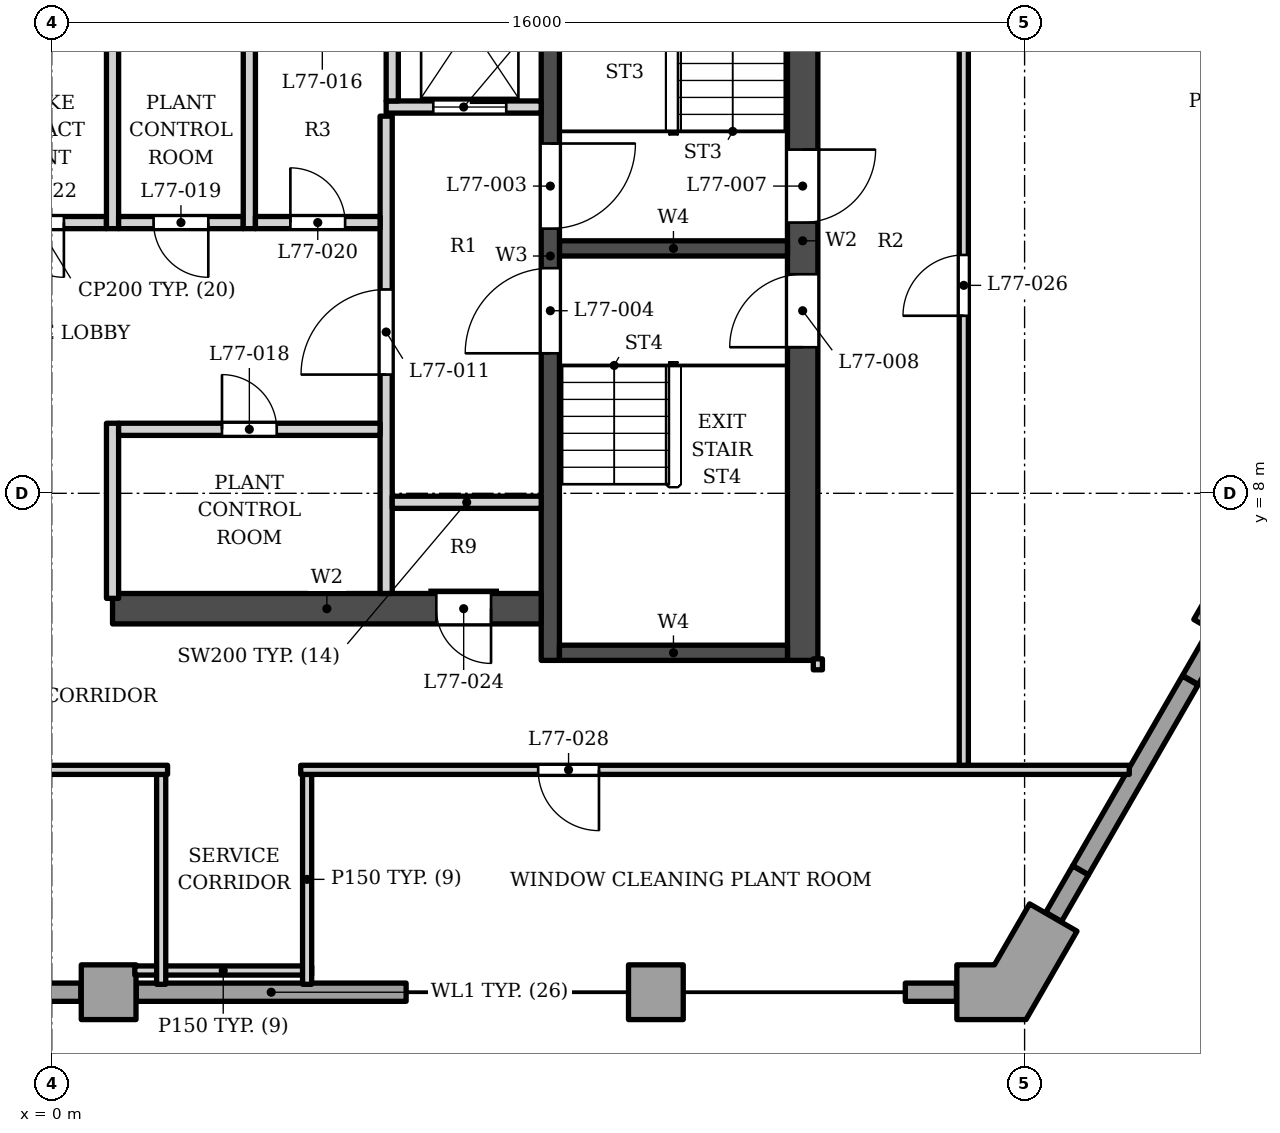
"""IFC4 building model, lengths in metres.
Left out: names, types, materials, properties, quantities, classifications, styles, units other than length and angle.
Written with IfcOpenShell. Run it as: python <this file> out.ifc"""

import sys

from ifc_helpers import new_model, si_unit, direction, frame, frame_2d, origin, place, context, subcontext, project, spatial, polyline, rectangle, outline, extrude, element, fill, save


model = new_model("IFC4")
c1 = context("Model", 3, precision=1e-05, world=origin(), true_north=direction((0.0, 1.0)))
c2 = subcontext(c1, "Body", "Model", "MODEL_VIEW")
j1 = project(units=[si_unit("LENGTHUNIT", "METRE"), si_unit("PLANEANGLEUNIT", "RADIAN")], contexts=[c1])
p1 = place(None, origin())
s1 = spatial("IfcSite", under=j1, at=p1, CompositionType="ELEMENT")
p2 = place(p1, origin())
s2 = spatial("IfcBuilding", under=s1, at=p2, CompositionType="ELEMENT")
p3 = place(p2, frame((0.0, 0.0, 330.5)))
s3 = spatial("IfcBuildingStorey", under=s2, at=p3, CompositionType="ELEMENT", Elevation=330.5)
p4 = place(p3, frame((12.35, 5.253, 0.0), z_axis=(0.0, 0.0, 1.0), x_axis=(0.0, 1.0, 0.0)))
e1 = element("IfcWall", 1, at=p4, inside=s3, PredefinedType="SHEAR", context=c2, shape_type="SweptSolid", body=[
    extrude(rectangle(XDim=13.8, YDim=0.5, at=frame_2d((6.9, 0.0))), origin(), (0.0, 0.0, 1.0), 5.0),
])
p5 = place(p4, frame((7.2, 0.0, 0.0)))
e2 = element("IfcOpeningElement", 2, at=p5, cuts=e1, PredefinedType="OPENING", context=c2, shape_type="SweptSolid", body=[
    extrude(rectangle(XDim=1.2, YDim=2.1, at=frame_2d((0.6, 1.05))), frame((0.0, 0.26, 0.0), z_axis=(0.0, -1.0, 0.0), x_axis=(1.0, 0.0, 0.0)), (0.0, 0.0, 1.0), 0.52),
])
p6 = place(p4, frame((5.15, 0.0, 0.0)))
e3 = element("IfcOpeningElement", 3, at=p6, cuts=e1, PredefinedType="OPENING", context=c2, shape_type="SweptSolid", body=[
    extrude(rectangle(XDim=1.2, YDim=2.1, at=frame_2d((0.6, 1.05))), frame((0.0, 0.26, 0.0), z_axis=(0.0, -1.0, 0.0), x_axis=(1.0, 0.0, 0.0)), (0.0, 0.0, 1.0), 0.52),
])
p7 = place(p3, frame((8.2, 5.253, 0.0), z_axis=(0.0, 0.0, 1.0), x_axis=(0.0, 1.0, 0.0)))
e4 = element("IfcWall", 4, at=p7, inside=s3, PredefinedType="SHEAR", context=c2, shape_type="SweptSolid", body=[
    extrude(rectangle(XDim=13.3, YDim=0.3, at=frame_2d((6.65, 0.0))), origin(), (0.0, 0.0, 1.0), 5.0),
])
p8 = place(p7, frame((7.1, 0.0, 0.0)))
e5 = element("IfcOpeningElement", 5, at=p8, cuts=e4, PredefinedType="OPENING", context=c2, shape_type="SweptSolid", body=[
    extrude(rectangle(XDim=1.4, YDim=2.1, at=frame_2d((0.7, 1.05))), frame((0.0, 0.16, 0.0), z_axis=(0.0, -1.0, 0.0), x_axis=(1.0, 0.0, 0.0)), (0.0, 0.0, 1.0), 0.32),
])
p9 = place(p7, frame((5.05, 0.0, 0.0)))
e6 = element("IfcOpeningElement", 6, at=p9, cuts=e4, PredefinedType="OPENING", context=c2, shape_type="SweptSolid", body=[
    extrude(rectangle(XDim=1.4, YDim=2.1, at=frame_2d((0.7, 1.05))), frame((0.0, 0.16, 0.0), z_axis=(0.0, -1.0, 0.0), x_axis=(1.0, 0.0, 0.0)), (0.0, 0.0, 1.0), 0.32),
])
for number, where, z_axis, x_axis in (
    (7, (8.35, 12.028, 0.0), (0.0, 0.0, 1.0), (1.0, 0.0, 0.0)),
    (8, (8.35, 5.378, 0.0), (0.0, 0.0, 1.0), (1.0, 0.0, 0.0)),
):
    element("IfcWall", number, at=place(p3, frame(where, z_axis=z_axis, x_axis=x_axis)), inside=s3, PredefinedType="SHEAR", context=c2, shape_type="SweptSolid", body=[
        extrude(rectangle(XDim=3.75, YDim=0.25, at=frame_2d((1.875, 0.0))), origin(), (0.0, 0.0, 1.0), 5.0),
    ])
p10 = place(p3, frame((1.0, 6.103, 0.0), z_axis=(0.0, 0.0, 1.0), x_axis=(1.0, 0.0, 0.0)))
e9 = element("IfcWall", 9, at=p10, inside=s3, PredefinedType="SHEAR", context=c2, shape_type="SweptSolid", body=[
    extrude(rectangle(XDim=7.05, YDim=0.5, at=frame_2d((3.525, 0.0))), origin(), (0.0, 0.0, 1.0), 5.0),
])
p11 = place(p10, frame((5.325, 0.0, 0.0)))
e10 = element("IfcOpeningElement", 10, at=p11, cuts=e9, PredefinedType="OPENING", context=c2, shape_type="SweptSolid", body=[
    extrude(rectangle(XDim=0.9, YDim=2.1, at=frame_2d((0.45, 1.05))), frame((0.0, 0.26, 0.0), z_axis=(0.0, -1.0, 0.0), x_axis=(1.0, 0.0, 0.0)), (0.0, 0.0, 1.0), 0.52),
])
p12 = place(p3, origin())
e11 = element("IfcWall", 11, at=p12, inside=s3, PredefinedType="SOLIDWALL", context=c2, shape_type="SweptSolid", body=[
    extrude(outline(polyline([(1.386, 0.246), (0.486, 0.246), (0.486, -0.655), (1.386, -0.655), (1.386, 0.246)])), origin(), (0.0, 0.0, 1.0), 3.297),
])
p13 = place(p3, origin())
e12 = element("IfcWall", 12, at=p13, inside=s3, PredefinedType="SOLIDWALL", context=c2, shape_type="SweptSolid", body=[
    extrude(outline(polyline([(10.386, 0.246), (9.486, 0.246), (9.486, -0.655), (10.386, -0.655), (10.386, 0.246)])), origin(), (0.0, 0.0, 1.0), 3.297),
])
p14 = place(p3, frame((16.922, 1.803, 0.0), z_axis=(0.0, 0.0, 1.0), x_axis=(0.500012057535, 0.866018442252, 0.0)))
e13 = element("IfcWall", 13, at=p14, inside=s3, PredefinedType="ELEMENTEDWALL", context=c2, shape_type="SweptSolid", body=[
    extrude(rectangle(XDim=3.6, YDim=0.3, at=frame_2d((1.8, 0.0))), origin(), (0.0, 0.0, 1.0), 3.8),
])
p15 = place(p3, origin())
e14 = element("IfcWall", 14, at=p15, inside=s3, PredefinedType="SOLIDWALL", context=c2, shape_type="SweptSolid", body=[
    extrude(outline(polyline([(14.886, 0.246), (14.886, -0.655), (16.023, -0.655), (16.862, 0.799), (16.083, 1.249), (15.504, 0.246), (14.886, 0.246)])), origin(), (0.0, 0.0, 1.0), 3.297),
])
p16 = place(p3, origin())
e15 = element("IfcWall", 15, at=p16, inside=s3, PredefinedType="SOLIDWALL", context=c2, shape_type="SweptSolid", body=[
    extrude(outline(polyline([(18.783, 5.925), (19.562, 5.475), (20.247, 6.661), (21.059, 7.549), (20.395, 8.156), (19.516, 7.196), (18.783, 5.925)])), origin(), (0.0, 0.0, 1.0), 3.8),
])
p17 = place(p3, frame((-7.61, -0.204, 0.0), z_axis=(0.0, 0.0, 1.0), x_axis=(1.0, 0.0, 0.0)))
e16 = element("IfcWall", 16, at=p17, inside=s3, PredefinedType="ELEMENTEDWALL", context=c2, shape_type="SweptSolid", body=[
    extrude(rectangle(XDim=8.089, YDim=0.3, at=frame_2d((4.044, 0.0))), origin(), (0.0, 0.0, 1.0), 3.279),
])
p18 = place(p3, frame((1.39, -0.204, 0.0), z_axis=(0.0, 0.0, 1.0), x_axis=(1.0, 0.0, 0.0)))
e17 = element("IfcWall", 17, at=p18, inside=s3, PredefinedType="ELEMENTEDWALL", context=c2, shape_type="SweptSolid", body=[
    extrude(rectangle(XDim=4.438, YDim=0.3, at=frame_2d((2.219, 0.0))), origin(), (0.0, 0.0, 1.0), 3.279),
])
p19 = place(p3, frame((14.038, -0.204, 0.0), z_axis=(0.0, 0.0, 1.0), x_axis=(1.0, 0.0, 0.0)))
e18 = element("IfcWall", 18, at=p19, inside=s3, PredefinedType="ELEMENTEDWALL", context=c2, shape_type="SweptSolid", body=[
    extrude(rectangle(XDim=0.84, YDim=0.3, at=frame_2d((0.42, 0.0))), origin(), (0.0, 0.0, 1.0), 3.279),
])
for number, where, z_axis, x_axis in (
    (19, (16.479, 1.034, 0.0), (0.0, 0.0, 1.0), (0.5, 0.866, 0.0)),
    (20, (18.729, 4.931, 0.0), (0.0, 0.0, 1.0), (0.5, 0.866, 0.0)),
):
    element("IfcWall", number, at=place(p3, frame(where, z_axis=z_axis, x_axis=x_axis)), inside=s3, PredefinedType="ELEMENTEDWALL", context=c2, shape_type="SweptSolid", body=[
        extrude(rectangle(XDim=0.884, YDim=0.3, at=frame_2d((0.442, 0.0))), origin(), (0.0, 0.0, 1.0), 3.8),
    ])
p20 = place(p3, frame((1.0, 6.273, 0.0), z_axis=(0.0, 0.0, 1.0), x_axis=(0.0, 1.0, 0.0)))
e21 = element("IfcWall", 21, at=p20, inside=s3, PredefinedType="PARTITIONING", context=c2, shape_type="SweptSolid", body=[
    extrude(rectangle(XDim=2.88, YDim=0.2, at=frame_2d((1.44, 0.0))), origin(), (0.0, 0.0, 1.0), 4.8),
])
p21 = place(p3, frame((5.5, 6.353, 0.0), z_axis=(0.0, 0.0, 1.0), x_axis=(0.0, 1.0, 0.0)))
e22 = element("IfcWall", 22, at=p21, inside=s3, PredefinedType="SOLIDWALL", context=c2, shape_type="SweptSolid", body=[
    extrude(rectangle(XDim=7.85, YDim=0.2, at=frame_2d((3.925, 0.0))), origin(), (0.0, 0.0, 1.0), 4.8),
])
p22 = place(p21, frame((3.6, 0.0, 0.0)))
e23 = element("IfcOpeningElement", 23, at=p22, cuts=e22, PredefinedType="OPENING", context=c2, shape_type="SweptSolid", body=[
    extrude(rectangle(XDim=1.4, YDim=2.1, at=frame_2d((0.7, 1.05))), frame((0.0, 0.11, 0.0), z_axis=(0.0, -1.0, 0.0), x_axis=(1.0, 0.0, 0.0)), (0.0, 0.0, 1.0), 0.22),
])
p23 = place(p3, frame((5.6, 7.853, 0.0), z_axis=(0.0, 0.0, 1.0), x_axis=(1.0, 0.0, 0.0)))
e24 = element("IfcWall", 24, at=p23, inside=s3, PredefinedType="SOLIDWALL", context=c2, shape_type="SweptSolid", body=[
    extrude(rectangle(XDim=2.45, YDim=0.2, at=frame_2d((1.225, 0.0))), origin(), (0.0, 0.0, 1.0), 4.8),
])
p24 = place(p3, frame((1.1, 9.052, 0.0), z_axis=(0.0, 0.0, 1.0), x_axis=(1.0, 0.0, 0.0)))
e25 = element("IfcWall", 25, at=p24, inside=s3, PredefinedType="PARTITIONING", context=c2, shape_type="SweptSolid", body=[
    extrude(rectangle(XDim=4.3, YDim=0.2, at=frame_2d((2.15, 0.0))), origin(), (0.0, 0.0, 1.0), 4.8),
])
p25 = place(p24, frame((1.7, 0.0, 0.0)))
e26 = element("IfcOpeningElement", 26, at=p25, cuts=e25, PredefinedType="OPENING", context=c2, shape_type="SweptSolid", body=[
    extrude(rectangle(XDim=0.9, YDim=2.1, at=frame_2d((0.45, 1.05))), frame((0.0, 0.11, 0.0), z_axis=(0.0, -1.0, 0.0), x_axis=(1.0, 0.0, 0.0)), (0.0, 0.0, 1.0), 0.22),
])
p26 = place(p3, frame((-1.4, 12.453, 0.0), z_axis=(0.0, 0.0, 1.0), x_axis=(1.0, 0.0, 0.0)))
e27 = element("IfcWall", 27, at=p26, inside=s3, PredefinedType="PARTITIONING", context=c2, shape_type="SweptSolid", body=[
    extrude(rectangle(XDim=2.3, YDim=0.2, at=frame_2d((1.15, 0.0))), origin(), (0.0, 0.0, 1.0), 4.8),
])
p27 = place(p26, frame((0.7, 0.0, 0.0)))
e28 = element("IfcOpeningElement", 28, at=p27, cuts=e27, PredefinedType="OPENING", context=c2, shape_type="SweptSolid", body=[
    extrude(rectangle(XDim=0.9, YDim=2.1, at=frame_2d((0.45, 1.05))), frame((0.0, 0.11, 0.0), z_axis=(0.0, -1.0, 0.0), x_axis=(1.0, 0.0, 0.0)), (0.0, 0.0, 1.0), 0.22),
])
p28 = place(p3, frame((1.0, 12.353, 0.0), z_axis=(0.0, 0.0, 1.0), x_axis=(0.0, 1.0, 0.0)))
e29 = element("IfcWall", 29, at=p28, inside=s3, PredefinedType="PARTITIONING", context=c2, shape_type="SweptSolid", body=[
    extrude(rectangle(XDim=3.2, YDim=0.2, at=frame_2d((1.6, 0.0))), origin(), (0.0, 0.0, 1.0), 4.8),
])
p29 = place(p3, frame((1.1, 12.453, 0.0), z_axis=(0.0, 0.0, 1.0), x_axis=(1.0, 0.0, 0.0)))
e30 = element("IfcWall", 30, at=p29, inside=s3, PredefinedType="PARTITIONING", context=c2, shape_type="SweptSolid", body=[
    extrude(rectangle(XDim=2.05, YDim=0.2, at=frame_2d((1.025, 0.0))), origin(), (0.0, 0.0, 1.0), 4.8),
])
p30 = place(p29, frame((0.575, 0.0, 0.0)))
e31 = element("IfcOpeningElement", 31, at=p30, cuts=e30, PredefinedType="OPENING", context=c2, shape_type="SweptSolid", body=[
    extrude(rectangle(XDim=0.9, YDim=2.1, at=frame_2d((0.45, 1.05))), frame((0.0, 0.11, 0.0), z_axis=(0.0, -1.0, 0.0), x_axis=(1.0, 0.0, 0.0)), (0.0, 0.0, 1.0), 0.22),
])
p31 = place(p3, frame((3.25, 12.353, 0.0), z_axis=(0.0, 0.0, 1.0), x_axis=(0.0, 1.0, 0.0)))
e32 = element("IfcWall", 32, at=p31, inside=s3, PredefinedType="PARTITIONING", context=c2, shape_type="SweptSolid", body=[
    extrude(rectangle(XDim=3.2, YDim=0.2, at=frame_2d((1.6, 0.0))), origin(), (0.0, 0.0, 1.0), 4.8),
])
p32 = place(p3, frame((3.35, 12.453, 0.0), z_axis=(0.0, 0.0, 1.0), x_axis=(1.0, 0.0, 0.0)))
e33 = element("IfcWall", 33, at=p32, inside=s3, PredefinedType="PARTITIONING", context=c2, shape_type="SweptSolid", body=[
    extrude(rectangle(XDim=2.05, YDim=0.2, at=frame_2d((1.025, 0.0))), origin(), (0.0, 0.0, 1.0), 4.8),
])
p33 = place(p32, frame((0.575, 0.0, 0.0)))
e34 = element("IfcOpeningElement", 34, at=p33, cuts=e33, PredefinedType="OPENING", context=c2, shape_type="SweptSolid", body=[
    extrude(rectangle(XDim=0.9, YDim=2.1, at=frame_2d((0.45, 1.05))), frame((0.0, 0.11, 0.0), z_axis=(0.0, -1.0, 0.0), x_axis=(1.0, 0.0, 0.0)), (0.0, 0.0, 1.0), 0.22),
])
p34 = place(p3, frame((5.5, 14.353, 0.0), z_axis=(0.0, 0.0, 1.0), x_axis=(1.0, 0.0, 0.0)))
e35 = element("IfcWall", 35, at=p34, inside=s3, PredefinedType="SOLIDWALL", context=c2, shape_type="SweptSolid", body=[
    extrude(rectangle(XDim=2.55, YDim=0.2, at=frame_2d((1.275, 0.0))), origin(), (0.0, 0.0, 1.0), 4.8),
])
p35 = place(p34, frame((0.775, 0.0, 0.0)))
e36 = element("IfcOpeningElement", 36, at=p35, cuts=e35, PredefinedType="OPENING", context=c2, shape_type="SweptSolid", body=[
    extrude(rectangle(XDim=1.2, YDim=2.1, at=frame_2d((0.6, 1.05))), frame((0.0, 0.11, 0.0), z_axis=(0.0, -1.0, 0.0), x_axis=(1.0, 0.0, 0.0)), (0.0, 0.0, 1.0), 0.22),
])
p36 = place(p3, frame((5.6, 14.453, 0.0), z_axis=(0.0, 0.0, 1.0), x_axis=(0.0, 1.0, 0.0)))
e37 = element("IfcWall", 37, at=p36, inside=s3, PredefinedType="SOLIDWALL", context=c2, shape_type="SweptSolid", body=[
    extrude(rectangle(XDim=3.9, YDim=0.2, at=frame_2d((1.95, 0.0))), origin(), (0.0, 0.0, 1.0), 4.8),
])
p37 = place(p3, frame((1.366, 0.153, 0.0), z_axis=(0.0, 0.0, 1.0), x_axis=(1.0, 0.0, 0.0)))
e38 = element("IfcWall", 38, at=p37, inside=s3, PredefinedType="PARTITIONING", context=c2, shape_type="SweptSolid", body=[
    extrude(rectangle(XDim=2.909, YDim=0.15, at=frame_2d((1.455, 0.0))), origin(), (0.0, 0.0, 1.0), 3.912),
])
for number, where, z_axis, x_axis in (
    (39, (1.8, -0.074, 0.0), (0.0, 0.0, 1.0), (0.0, 1.0, 0.0)),
    (40, (4.2, -0.074, 0.0), (0.0, 0.0, 1.0), (0.0, 1.0, 0.0)),
):
    element("IfcWall", number, at=place(p3, frame(where, z_axis=z_axis, x_axis=x_axis)), inside=s3, PredefinedType="PARTITIONING", context=c2, shape_type="SweptSolid", body=[
        extrude(outline(polyline([(0.0, 0.0), (3.452, 0.0), (3.452, 4.8), (1.211, 4.8), (0.0, 3.784), (0.0, 0.0)])), frame((0.0, 0.075, 0.0), z_axis=(0.0, -1.0, 0.0), x_axis=(1.0, 0.0, 0.0)), (0.0, 0.0, 1.0), 0.15),
    ])
p38 = place(p3, frame((-15.85, 3.453, 0.0), z_axis=(0.0, 0.0, 1.0), x_axis=(1.0, 0.0, 0.0)))
e41 = element("IfcWall", 41, at=p38, inside=s3, PredefinedType="PARTITIONING", context=c2, shape_type="SweptSolid", body=[
    extrude(rectangle(XDim=17.755, YDim=0.15, at=frame_2d((8.877, 0.0))), origin(), (0.0, 0.0, 1.0), 4.8),
])
p39 = place(p38, frame((10.05, 0.0, 0.0)))
e42 = element("IfcOpeningElement", 42, at=p39, cuts=e41, PredefinedType="OPENING", context=c2, shape_type="SweptSolid", body=[
    extrude(rectangle(XDim=1.0, YDim=2.1, at=frame_2d((0.5, 1.05))), frame((0.0, 0.085, 0.0), z_axis=(0.0, -1.0, 0.0), x_axis=(1.0, 0.0, 0.0)), (0.0, 0.0, 1.0), 0.17),
])
p40 = place(p3, frame((4.095, 3.453, 0.0), z_axis=(0.0, 0.0, 1.0), x_axis=(1.0, 0.0, 0.0)))
e43 = element("IfcWall", 43, at=p40, inside=s3, PredefinedType="PARTITIONING", context=c2, shape_type="SweptSolid", body=[
    extrude(rectangle(XDim=13.627, YDim=0.15, at=frame_2d((6.813, 0.0))), origin(), (0.0, 0.0, 1.0), 4.8),
])
p41 = place(p40, frame((3.905, 0.0, 0.0)))
e44 = element("IfcOpeningElement", 44, at=p41, cuts=e43, PredefinedType="OPENING", context=c2, shape_type="SweptSolid", body=[
    extrude(rectangle(XDim=1.0, YDim=2.1, at=frame_2d((0.5, 1.05))), frame((0.0, 0.085, 0.0), z_axis=(0.0, -1.0, 0.0), x_axis=(1.0, 0.0, 0.0)), (0.0, 0.0, 1.0), 0.17),
])
p42 = place(p3, frame((15.0, 3.528, 0.0), z_axis=(0.0, 0.0, 1.0), x_axis=(0.0, 1.0, 0.0)))
e45 = element("IfcWall", 45, at=p42, inside=s3, PredefinedType="PARTITIONING", context=c2, shape_type="SweptSolid", body=[
    extrude(rectangle(XDim=15.83, YDim=0.15, at=frame_2d((7.915, 0.0))), origin(), (0.0, 0.0, 1.0), 4.02),
])
p43 = place(p42, frame((7.392, 0.0, 0.0)))
e46 = element("IfcOpeningElement", 46, at=p43, cuts=e45, PredefinedType="OPENING", context=c2, shape_type="SweptSolid", body=[
    extrude(rectangle(XDim=1.0, YDim=2.1, at=frame_2d((0.5, 1.05))), frame((0.0, 0.085, 0.0), z_axis=(0.0, -1.0, 0.0), x_axis=(1.0, 0.0, 0.0)), (0.0, 0.0, 1.0), 0.17),
])
p44 = place(p3, frame((12.6, 5.098, 0.0), z_axis=(0.0, 0.0, 1.0), x_axis=(0.0, 1.0, 0.0)))
e47 = element("IfcWall", 47, at=p44, inside=s3, PredefinedType="PARTITIONING", context=c2, shape_type="SweptSolid", body=[
    extrude(rectangle(XDim=0.18, YDim=0.15, at=frame_2d((0.09, 0.0))), origin(), (0.0, 0.0, 1.0), 4.8),
])
p45 = place(p35, origin())
e48 = element("IfcDoor", 48, at=p45, inside=s3, OperationType="DOUBLE_DOOR_SLIDING", PredefinedType="DOOR", context=c2, shape_type="SweptSolid", body=[
    extrude(rectangle(XDim=1.2, YDim=2.1, at=frame_2d((0.6, 1.05))), frame((0.0, 0.025, 0.0), z_axis=(0.0, -1.0, 0.0), x_axis=(1.0, 0.0, 0.0)), (0.0, 0.0, 1.0), 0.05),
])
fill(e36, e48)
p46 = place(p8, origin())
e49 = element("IfcDoor", 49, at=p46, inside=s3, OperationType="SINGLE_SWING_RIGHT", PredefinedType="DOOR", context=c2, shape_type="SweptSolid", body=[
    extrude(rectangle(XDim=1.4, YDim=2.1, at=frame_2d((0.7, 1.05))), frame((0.0, 0.025, 0.0), z_axis=(0.0, -1.0, 0.0), x_axis=(1.0, 0.0, 0.0)), (0.0, 0.0, 1.0), 0.05),
])
fill(e5, e49)
p47 = place(p9, origin())
e50 = element("IfcDoor", 50, at=p47, inside=s3, OperationType="SINGLE_SWING_LEFT", PredefinedType="DOOR", context=c2, shape_type="SweptSolid", body=[
    extrude(rectangle(XDim=1.4, YDim=2.1, at=frame_2d((0.7, 1.05))), frame((0.0, 0.025, 0.0), z_axis=(0.0, -1.0, 0.0), x_axis=(1.0, 0.0, 0.0)), (0.0, 0.0, 1.0), 0.05),
])
fill(e6, e50)
p48 = place(p5, origin())
e51 = element("IfcDoor", 51, at=p48, inside=s3, OperationType="SINGLE_SWING_RIGHT", PredefinedType="DOOR", context=c2, shape_type="SweptSolid", body=[
    extrude(rectangle(XDim=1.2, YDim=2.1, at=frame_2d((0.6, 1.05))), frame((0.0, 0.025, 0.0), z_axis=(0.0, -1.0, 0.0), x_axis=(1.0, 0.0, 0.0)), (0.0, 0.0, 1.0), 0.05),
])
fill(e2, e51)
p49 = place(p6, origin())
e52 = element("IfcDoor", 52, at=p49, inside=s3, OperationType="SINGLE_SWING_LEFT", PredefinedType="DOOR", context=c2, shape_type="SweptSolid", body=[
    extrude(rectangle(XDim=1.2, YDim=2.1, at=frame_2d((0.6, 1.05))), frame((0.0, 0.025, 0.0), z_axis=(0.0, -1.0, 0.0), x_axis=(1.0, 0.0, 0.0)), (0.0, 0.0, 1.0), 0.05),
])
fill(e3, e52)
p50 = place(p22, origin())
e53 = element("IfcDoor", 53, at=p50, inside=s3, OperationType="SINGLE_SWING_LEFT", PredefinedType="DOOR", context=c2, shape_type="SweptSolid", body=[
    extrude(rectangle(XDim=1.4, YDim=2.1, at=frame_2d((0.7, 1.05))), frame((0.0, 0.025, 0.0), z_axis=(0.0, -1.0, 0.0), x_axis=(1.0, 0.0, 0.0)), (0.0, 0.0, 1.0), 0.05),
])
fill(e23, e53)
p51 = place(p25, origin())
e54 = element("IfcDoor", 54, at=p51, inside=s3, OperationType="SINGLE_SWING_LEFT", PredefinedType="DOOR", context=c2, shape_type="SweptSolid", body=[
    extrude(rectangle(XDim=0.9, YDim=2.1, at=frame_2d((0.45, 1.05))), frame((0.0, 0.025, 0.0), z_axis=(0.0, -1.0, 0.0), x_axis=(1.0, 0.0, 0.0)), (0.0, 0.0, 1.0), 0.05),
])
fill(e26, e54)
p52 = place(p30, origin())
e55 = element("IfcDoor", 55, at=p52, inside=s3, OperationType="SINGLE_SWING_RIGHT", PredefinedType="DOOR", context=c2, shape_type="SweptSolid", body=[
    extrude(rectangle(XDim=0.9, YDim=2.1, at=frame_2d((0.45, 1.05))), frame((0.0, 0.025, 0.0), z_axis=(0.0, -1.0, 0.0), x_axis=(1.0, 0.0, 0.0)), (0.0, 0.0, 1.0), 0.05),
])
fill(e31, e55)
p53 = place(p33, origin())
e56 = element("IfcDoor", 56, at=p53, inside=s3, OperationType="SINGLE_SWING_LEFT", PredefinedType="DOOR", context=c2, shape_type="SweptSolid", body=[
    extrude(rectangle(XDim=0.9, YDim=2.1, at=frame_2d((0.45, 1.05))), frame((0.0, 0.025, 0.0), z_axis=(0.0, -1.0, 0.0), x_axis=(1.0, 0.0, 0.0)), (0.0, 0.0, 1.0), 0.05),
])
fill(e34, e56)
p54 = place(p27, origin())
e57 = element("IfcDoor", 57, at=p54, inside=s3, OperationType="SINGLE_SWING_RIGHT", PredefinedType="DOOR", context=c2, shape_type="SweptSolid", body=[
    extrude(rectangle(XDim=0.9, YDim=2.1, at=frame_2d((0.45, 1.05))), frame((0.0, 0.025, 0.0), z_axis=(0.0, -1.0, 0.0), x_axis=(1.0, 0.0, 0.0)), (0.0, 0.0, 1.0), 0.05),
])
fill(e28, e57)
p55 = place(p11, origin())
e58 = element("IfcDoor", 58, at=p55, inside=s3, OperationType="SINGLE_SWING_RIGHT", PredefinedType="DOOR", context=c2, shape_type="SweptSolid", body=[
    extrude(rectangle(XDim=0.9, YDim=2.1, at=frame_2d((0.45, 1.05))), frame((0.0, 0.025, 0.0), z_axis=(0.0, -1.0, 0.0), x_axis=(1.0, 0.0, 0.0)), (0.0, 0.0, 1.0), 0.05),
])
fill(e10, e58)
p56 = place(p43, origin())
e59 = element("IfcDoor", 59, at=p56, inside=s3, OperationType="SINGLE_SWING_LEFT", PredefinedType="DOOR", context=c2, shape_type="SweptSolid", body=[
    extrude(rectangle(XDim=1.0, YDim=2.1, at=frame_2d((0.5, 1.05))), frame((0.0, 0.025, 0.0), z_axis=(0.0, -1.0, 0.0), x_axis=(1.0, 0.0, 0.0)), (0.0, 0.0, 1.0), 0.05),
])
fill(e46, e59)
p57 = place(p41, origin())
e60 = element("IfcDoor", 60, at=p57, inside=s3, OperationType="SINGLE_SWING_RIGHT", PredefinedType="DOOR", context=c2, shape_type="SweptSolid", body=[
    extrude(rectangle(XDim=1.0, YDim=2.1, at=frame_2d((0.5, 1.05))), frame((0.0, 0.025, 0.0), z_axis=(0.0, -1.0, 0.0), x_axis=(1.0, 0.0, 0.0)), (0.0, 0.0, 1.0), 0.05),
])
fill(e44, e60)
save(model, sys.argv[1])
